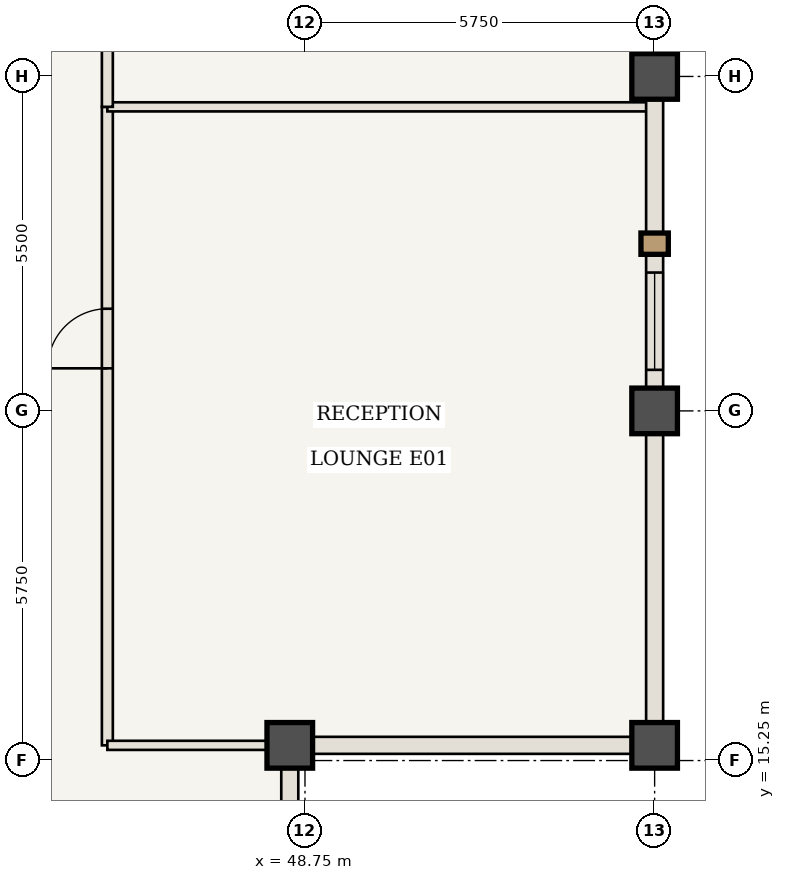
"""IFC4 building model, lengths in metres.
Left out: names, types, materials, properties, quantities, classifications, styles, units other than length and angle.
Written with IfcOpenShell. Run it as: python <this file> out.ifc"""

import sys

from ifc_helpers import new_model, si_unit, direction, frame, frame_2d, origin, origin_2d, place, context, subcontext, project, spatial, rectangle, extrude, element, fill, save


model = new_model("IFC4")
c1 = context("Model", 3, precision=1e-05, world=origin(), true_north=direction((0.0, 1.0)))
c2 = subcontext(c1, "Body", "Model", "MODEL_VIEW")
j1 = project(units=[si_unit("LENGTHUNIT", "METRE"), si_unit("PLANEANGLEUNIT", "RADIAN")], contexts=[c1])
p1 = place(None, origin())
s1 = spatial("IfcSite", under=j1, at=p1, CompositionType="ELEMENT")
p2 = place(p1, origin())
s2 = spatial("IfcBuilding", under=s1, at=p2, CompositionType="ELEMENT")
p3 = place(p2, frame((0.0, 0.0, 262.15)))
s3 = spatial("IfcBuildingStorey", under=s2, at=p3, CompositionType="ELEMENT", Elevation=262.15)
for number, where, z_axis, x_axis in (
    (1, (48.5, 15.5, 0.0), (0.0, 0.0, 1.0), (1.0, 0.0, 0.0)),
    (2, (54.5, 15.5, 0.0), (0.0, 0.0, 1.0), (1.0, 0.0, 0.0)),
    (3, (54.5, 21.0, 0.0), (0.0, 0.0, 1.0), (1.0, 0.0, 0.0)),
    (4, (54.5, 26.5, 0.0), (0.0, 0.0, 1.0), (1.0, 0.0, 0.0)),
):
    element("IfcColumn", number, at=place(p3, frame(where, z_axis=z_axis, x_axis=x_axis)), inside=s3, PredefinedType="COLUMN", context=c2, shape_type="SweptSolid", body=[
        extrude(rectangle(XDim=0.75, YDim=0.75, at=origin_2d()), origin(), (0.0, 0.0, 1.0), 3.85),
    ])
p4 = place(p3, frame((45.5, 15.5, 0.0), z_axis=(0.0, 0.0, 1.0), x_axis=(0.0, 1.0, 0.0)))
e5 = element("IfcWall", 5, at=p4, inside=s3, PredefinedType="STANDARD", context=c2, shape_type="SweptSolid", body=[
    extrude(rectangle(XDim=10.5, YDim=0.18, at=frame_2d((5.25, 0.0))), origin(), (0.0, 0.0, 1.0), 3.43),
])
p5 = place(p4, frame((6.2, 0.0, 0.0)))
e6 = element("IfcOpeningElement", 6, at=p5, cuts=e5, PredefinedType="OPENING", context=c2, shape_type="SweptSolid", body=[
    extrude(rectangle(XDim=0.98, YDim=2.2, at=frame_2d((0.49, 1.1))), frame((0.0, 0.1, 0.0), z_axis=(0.0, -1.0, 0.0), x_axis=(1.0, 0.0, 0.0)), (0.0, 0.0, 1.0), 0.2),
])
p6 = place(p3, frame((45.5, 26.0, 0.0), z_axis=(0.0, 0.0, 1.0), x_axis=(1.0, 0.0, 0.0)))
e7 = element("IfcWall", 7, at=p6, inside=s3, PredefinedType="STANDARD", context=c2, shape_type="SweptSolid", body=[
    extrude(rectangle(XDim=8.94, YDim=0.15, at=frame_2d((4.47, 0.0))), origin(), (0.0, 0.0, 1.0), 3.43),
])
p7 = place(p3, frame((45.5, 26.0, 0.0), z_axis=(0.0, 0.0, 1.0), x_axis=(0.0, 1.0, 0.0)))
e8 = element("IfcWall", 8, at=p7, inside=s3, PredefinedType="STANDARD", context=c2, shape_type="SweptSolid", body=[
    extrude(rectangle(XDim=12.0, YDim=0.18, at=frame_2d((6.0, 0.0))), origin(), (0.0, 0.0, 1.0), 3.43),
])
p8 = place(p7, frame((6.95, 0.0, 0.0)))
e9 = element("IfcOpeningElement", 9, at=p8, cuts=e8, PredefinedType="OPENING", context=c2, shape_type="SweptSolid", body=[
    extrude(rectangle(XDim=0.98, YDim=2.2, at=frame_2d((0.49, 1.1))), frame((0.0, 0.1, 0.0), z_axis=(0.0, -1.0, 0.0), x_axis=(1.0, 0.0, 0.0)), (0.0, 0.0, 1.0), 0.2),
])
p9 = place(p3, frame((45.5, 15.5, 0.0), z_axis=(0.0, 0.0, 1.0), x_axis=(1.0, 0.0, 0.0)))
e10 = element("IfcWall", 10, at=p9, inside=s3, PredefinedType="STANDARD", context=c2, shape_type="SweptSolid", body=[
    extrude(rectangle(XDim=3.0, YDim=0.15, at=frame_2d((1.5, 0.0))), origin(), (0.0, 0.0, 1.0), 3.43),
])
p10 = place(p3, frame((54.5, 21.0, 0.0), z_axis=(0.0, 0.0, 1.0), x_axis=(0.0, -1.0, 0.0)))
e11 = element("IfcWall", 11, at=p10, inside=s3, PredefinedType="USERDEFINED", context=c2, shape_type="SweptSolid", body=[
    extrude(rectangle(XDim=5.5, YDim=0.28, at=frame_2d((2.75, 0.0))), origin(), (0.0, 0.0, 1.0), 2.73),
])
p11 = place(p3, frame((54.5, 26.5, 0.0), z_axis=(0.0, 0.0, 1.0), x_axis=(0.0, -1.0, 0.0)))
e12 = element("IfcWall", 12, at=p11, inside=s3, PredefinedType="USERDEFINED", context=c2, shape_type="SweptSolid", body=[
    extrude(rectangle(XDim=5.5, YDim=0.28, at=frame_2d((2.75, 0.0))), origin(), (0.0, 0.0, 1.0), 2.73),
])
p12 = place(p11, frame((3.225, 0.0, 0.85)))
e13 = element("IfcOpeningElement", 13, at=p12, cuts=e12, PredefinedType="OPENING", context=c2, shape_type="SweptSolid", body=[
    extrude(rectangle(XDim=1.6, YDim=1.68, at=frame_2d((0.8, 0.84))), frame((0.0, 0.15, 0.0), z_axis=(0.0, -1.0, 0.0), x_axis=(1.0, 0.0, 0.0)), (0.0, 0.0, 1.0), 0.3),
])
p13 = place(p3, frame((54.5, 32.0, 0.0), z_axis=(0.0, 0.0, 1.0), x_axis=(0.0, -1.0, 0.0)))
e14 = element("IfcWall", 14, at=p13, inside=s3, PredefinedType="USERDEFINED", context=c2, shape_type="SweptSolid", body=[
    extrude(rectangle(XDim=5.5, YDim=0.28, at=frame_2d((2.75, 0.0))), origin(), (0.0, 0.0, 1.0), 2.73),
])
p14 = place(p13, frame((1.5, 0.0, 0.85)))
e15 = element("IfcOpeningElement", 15, at=p14, cuts=e14, PredefinedType="OPENING", context=c2, shape_type="SweptSolid", body=[
    extrude(rectangle(XDim=2.5, YDim=1.68, at=frame_2d((1.25, 0.84))), frame((0.0, 0.15, 0.0), z_axis=(0.0, -1.0, 0.0), x_axis=(1.0, 0.0, 0.0)), (0.0, 0.0, 1.0), 0.3),
])
for number, where, z_axis, x_axis in (
    (16, (48.5, 15.5, 0.0), (0.0, 0.0, 1.0), (0.0, -1.0, 0.0)),
    (17, (54.5, 15.5, 0.0), (0.0, 0.0, 1.0), (-1.0, 0.0, 0.0)),
):
    element("IfcWall", number, at=place(p3, frame(where, z_axis=z_axis, x_axis=x_axis)), inside=s3, PredefinedType="USERDEFINED", context=c2, shape_type="SweptSolid", body=[
        extrude(rectangle(XDim=6.0, YDim=0.28, at=frame_2d((3.0, 0.0))), origin(), (0.0, 0.0, 1.0), 2.73),
    ])
p15 = place(p5, origin())
e18 = element("IfcDoor", 18, at=p15, inside=s3, OperationType="SINGLE_SWING_LEFT", PredefinedType="DOOR", context=c2, shape_type="SweptSolid", body=[
    extrude(rectangle(XDim=0.98, YDim=2.2, at=frame_2d((0.49, 1.1))), frame((0.0, 0.025, 0.0), z_axis=(0.0, -1.0, 0.0), x_axis=(1.0, 0.0, 0.0)), (0.0, 0.0, 1.0), 0.05),
])
fill(e6, e18)
p16 = place(p12, origin())
e19 = element("IfcWindow", 19, at=p16, inside=s3, PartitioningType="SINGLE_PANEL", PredefinedType="WINDOW", context=c2, shape_type="SweptSolid", body=[
    extrude(rectangle(XDim=1.6, YDim=1.68, at=frame_2d((0.8, 0.84))), frame((0.0, 0.03, 0.0), z_axis=(0.0, -1.0, 0.0), x_axis=(1.0, 0.0, 0.0)), (0.0, 0.0, 1.0), 0.06),
])
fill(e13, e19)
save(model, sys.argv[1])
